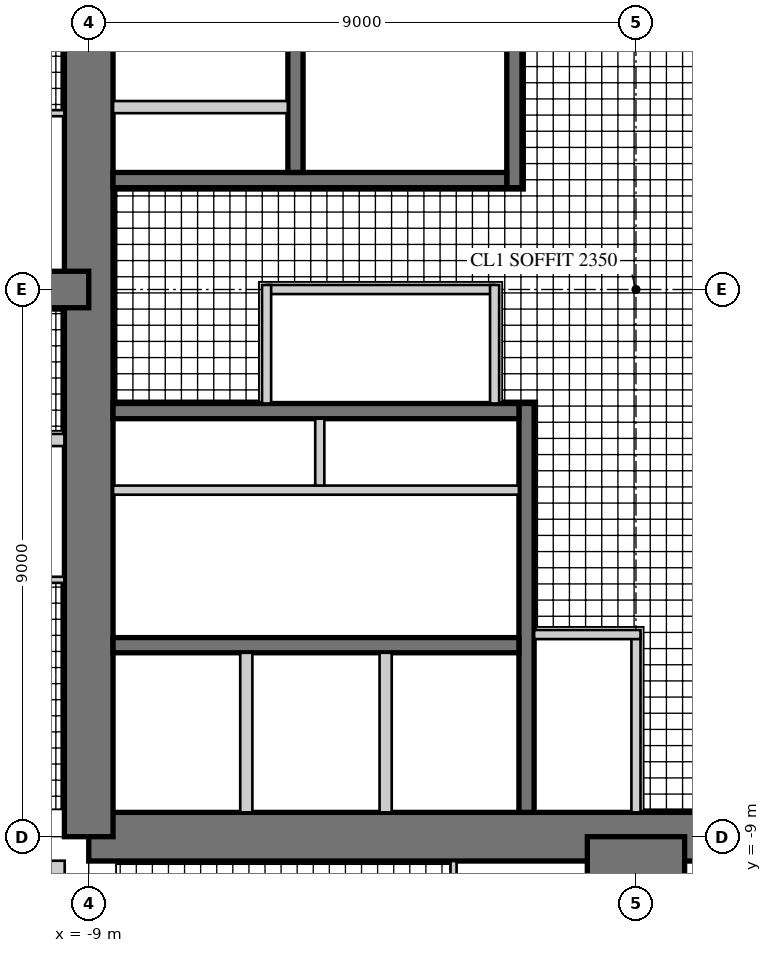
"""IFC4 building model, lengths in metres.
Left out: names, types, materials, properties, quantities, classifications, styles, units other than length and angle.
Written with IfcOpenShell. Run it as: python <this file> out.ifc"""

import sys

from ifc_helpers import new_model, si_unit, direction, frame, frame_2d, origin, place, context, subcontext, project, spatial, rectangle, extrude, element, fill, save


model = new_model("IFC4")
c1 = context("Model", 3, precision=1e-05, world=origin(), true_north=direction((0.0, 1.0)))
c2 = subcontext(c1, "Body", "Model", "MODEL_VIEW")
j1 = project(units=[si_unit("LENGTHUNIT", "METRE"), si_unit("PLANEANGLEUNIT", "RADIAN")], contexts=[c1])
p1 = place(None, origin())
s1 = spatial("IfcSite", under=j1, at=p1, CompositionType="ELEMENT")
p2 = place(p1, origin())
s2 = spatial("IfcBuilding", under=s1, at=p2, CompositionType="ELEMENT")
p3 = place(p2, frame((0.0, 0.0, 225.5)))
s3 = spatial("IfcBuildingStorey", under=s2, at=p3, CompositionType="ELEMENT", Elevation=225.5)
p4 = place(p3, frame((-9.0, -9.0, 0.0), z_axis=(0.0, 0.0, 1.0), x_axis=(1.0, 0.0, 0.0)))
e1 = element("IfcWall", 1, at=p4, inside=s3, PredefinedType="SHEAR", context=c2, shape_type="SweptSolid", body=[
    extrude(rectangle(XDim=18.0, YDim=0.8, at=frame_2d((9.0, 0.0))), origin(), (0.0, 0.0, 1.0), 3.4),
])
p5 = place(p4, frame((9.8, 0.0, 0.0)))
e2 = element("IfcOpeningElement", 2, at=p5, cuts=e1, PredefinedType="OPENING", context=c2, shape_type="SweptSolid", body=[
    extrude(rectangle(XDim=1.0, YDim=2.4, at=frame_2d((0.5, 1.2))), frame((0.0, 0.41, 0.0), z_axis=(0.0, -1.0, 0.0), x_axis=(1.0, 0.0, 0.0)), (0.0, 0.0, 1.0), 0.82),
])
p6 = place(p3, frame((-9.0, 9.0, 0.0), z_axis=(0.0, 0.0, 1.0), x_axis=(0.0, -1.0, 0.0)))
e3 = element("IfcWall", 3, at=p6, inside=s3, PredefinedType="SHEAR", context=c2, shape_type="SweptSolid", body=[
    extrude(rectangle(XDim=18.0, YDim=0.8, at=frame_2d((9.0, 0.0))), origin(), (0.0, 0.0, 1.0), 3.4),
])
p7 = place(p6, frame((9.8, 0.0, 0.0)))
e4 = element("IfcOpeningElement", 4, at=p7, cuts=e3, PredefinedType="OPENING", context=c2, shape_type="SweptSolid", body=[
    extrude(rectangle(XDim=1.0, YDim=2.4, at=frame_2d((0.5, 1.2))), frame((0.0, 0.41, 0.0), z_axis=(0.0, -1.0, 0.0), x_axis=(1.0, 0.0, 0.0)), (0.0, 0.0, 1.0), 0.82),
])
p8 = place(p3, frame((-2.0, 1.675, 0.0), z_axis=(0.0, 0.0, 1.0), x_axis=(0.0, 1.0, 0.0)))
e5 = element("IfcWall", 5, at=p8, inside=s3, PredefinedType="SHEAR", context=c2, shape_type="SweptSolid", body=[
    extrude(rectangle(XDim=6.925, YDim=0.25, at=frame_2d((3.462, 0.0))), origin(), (0.0, 0.0, 1.0), 3.4),
])
p9 = place(p8, frame((0.725, 0.0, 0.0)))
e6 = element("IfcOpeningElement", 6, at=p9, cuts=e5, PredefinedType="OPENING", context=c2, shape_type="SweptSolid", body=[
    extrude(rectangle(XDim=1.0, YDim=2.1, at=frame_2d((0.5, 1.05))), frame((0.0, 0.135, 0.0), z_axis=(0.0, -1.0, 0.0), x_axis=(1.0, 0.0, 0.0)), (0.0, 0.0, 1.0), 0.27),
])
p10 = place(p3, frame((-2.125, 1.8, 0.0), z_axis=(0.0, 0.0, 1.0), x_axis=(-1.0, 0.0, 0.0)))
e7 = element("IfcWall", 7, at=p10, inside=s3, PredefinedType="SHEAR", context=c2, shape_type="SweptSolid", body=[
    extrude(rectangle(XDim=6.475, YDim=0.25, at=frame_2d((3.238, 0.0))), origin(), (0.0, 0.0, 1.0), 3.4),
])
p11 = place(p3, frame((-5.6, 1.925, 0.0), z_axis=(0.0, 0.0, 1.0), x_axis=(0.0, 1.0, 0.0)))
e8 = element("IfcWall", 8, at=p11, inside=s3, PredefinedType="SHEAR", context=c2, shape_type="SweptSolid", body=[
    extrude(rectangle(XDim=3.55, YDim=0.25, at=frame_2d((1.775, 0.0))), origin(), (0.0, 0.0, 1.0), 3.4),
])
p12 = place(p11, frame((1.525, 0.0, 0.0)))
e9 = element("IfcOpeningElement", 9, at=p12, cuts=e8, PredefinedType="OPENING", context=c2, shape_type="SweptSolid", body=[
    extrude(rectangle(XDim=1.1, YDim=2.2, at=frame_2d((0.55, 1.1))), frame((0.0, 0.135, 0.0), z_axis=(0.0, -1.0, 0.0), x_axis=(1.0, 0.0, 0.0)), (0.0, 0.0, 1.0), 0.27),
])
p13 = place(p11, frame((0.075, 0.0, 0.0)))
e10 = element("IfcOpeningElement", 10, at=p13, cuts=e8, PredefinedType="OPENING", context=c2, shape_type="SweptSolid", body=[
    extrude(rectangle(XDim=0.8, YDim=2.1, at=frame_2d((0.4, 1.05))), frame((0.0, 0.135, 0.0), z_axis=(0.0, -1.0, 0.0), x_axis=(1.0, 0.0, 0.0)), (0.0, 0.0, 1.0), 0.27),
])
p14 = place(p3, frame((-5.725, 3.0, 0.0), z_axis=(0.0, 0.0, 1.0), x_axis=(-1.0, 0.0, 0.0)))
e11 = element("IfcWall", 11, at=p14, inside=s3, PredefinedType="PARTITIONING", context=c2, shape_type="SweptSolid", body=[
    extrude(rectangle(XDim=2.875, YDim=0.2, at=frame_2d((1.438, 0.0))), origin(), (0.0, 0.0, 1.0), 3.4),
])
p15 = place(p3, frame((-1.8, -1.875, 0.0), z_axis=(0.0, 0.0, 1.0), x_axis=(0.0, -1.0, 0.0)))
e12 = element("IfcWall", 12, at=p15, inside=s3, PredefinedType="SHEAR", context=c2, shape_type="SweptSolid", body=[
    extrude(rectangle(XDim=6.725, YDim=0.25, at=frame_2d((3.363, 0.0))), origin(), (0.0, 0.0, 1.0), 3.4),
])
p16 = place(p15, frame((1.875, 0.0, 0.0)))
e13 = element("IfcOpeningElement", 13, at=p16, cuts=e12, PredefinedType="OPENING", context=c2, shape_type="SweptSolid", body=[
    extrude(rectangle(XDim=1.6, YDim=2.4, at=frame_2d((0.8, 1.2))), frame((0.0, 0.135, 0.0), z_axis=(0.0, -1.0, 0.0), x_axis=(1.0, 0.0, 0.0)), (0.0, 0.0, 1.0), 0.27),
])
p17 = place(p3, frame((-1.925, -2.0, 0.0), z_axis=(0.0, 0.0, 1.0), x_axis=(-1.0, 0.0, 0.0)))
e14 = element("IfcWall", 14, at=p17, inside=s3, PredefinedType="SHEAR", context=c2, shape_type="SweptSolid", body=[
    extrude(rectangle(XDim=6.675, YDim=0.25, at=frame_2d((3.337, 0.0))), origin(), (0.0, 0.0, 1.0), 3.4),
])
p18 = place(p3, frame((-1.925, -5.85, 0.0), z_axis=(0.0, 0.0, 1.0), x_axis=(-1.0, 0.0, 0.0)))
e15 = element("IfcWall", 15, at=p18, inside=s3, PredefinedType="SHEAR", context=c2, shape_type="SweptSolid", body=[
    extrude(rectangle(XDim=6.675, YDim=0.25, at=frame_2d((3.337, 0.0))), origin(), (0.0, 0.0, 1.0), 3.4),
])
p19 = place(p18, frame((0.496, 0.0, 0.0)))
e16 = element("IfcOpeningElement", 16, at=p19, cuts=e15, PredefinedType="OPENING", context=c2, shape_type="SweptSolid", body=[
    extrude(rectangle(XDim=1.1, YDim=2.2, at=frame_2d((0.55, 1.1))), frame((0.0, 0.135, 0.0), z_axis=(0.0, -1.0, 0.0), x_axis=(1.0, 0.0, 0.0)), (0.0, 0.0, 1.0), 0.27),
])
p20 = place(p18, frame((2.788, 0.0, 0.0)))
e17 = element("IfcOpeningElement", 17, at=p20, cuts=e15, PredefinedType="OPENING", context=c2, shape_type="SweptSolid", body=[
    extrude(rectangle(XDim=1.1, YDim=2.2, at=frame_2d((0.55, 1.1))), frame((0.0, 0.135, 0.0), z_axis=(0.0, -1.0, 0.0), x_axis=(1.0, 0.0, 0.0)), (0.0, 0.0, 1.0), 0.27),
])
p21 = place(p18, frame((5.079, 0.0, 0.0)))
e18 = element("IfcOpeningElement", 18, at=p21, cuts=e15, PredefinedType="OPENING", context=c2, shape_type="SweptSolid", body=[
    extrude(rectangle(XDim=1.1, YDim=2.2, at=frame_2d((0.55, 1.1))), frame((0.0, 0.135, 0.0), z_axis=(0.0, -1.0, 0.0), x_axis=(1.0, 0.0, 0.0)), (0.0, 0.0, 1.0), 0.27),
])
p22 = place(p3, frame((-1.925, -3.3, 0.0), z_axis=(0.0, 0.0, 1.0), x_axis=(-1.0, 0.0, 0.0)))
e19 = element("IfcWall", 19, at=p22, inside=s3, PredefinedType="PARTITIONING", context=c2, shape_type="SweptSolid", body=[
    extrude(rectangle(XDim=6.675, YDim=0.15, at=frame_2d((3.337, 0.0))), origin(), (0.0, 0.0, 1.0), 3.4),
])
p23 = place(p22, frame((0.075, 0.0, 0.0)))
e20 = element("IfcOpeningElement", 20, at=p23, cuts=e19, PredefinedType="OPENING", context=c2, shape_type="SweptSolid", body=[
    extrude(rectangle(XDim=0.8, YDim=2.1, at=frame_2d((0.4, 1.05))), frame((0.0, 0.085, 0.0), z_axis=(0.0, -1.0, 0.0), x_axis=(1.0, 0.0, 0.0)), (0.0, 0.0, 1.0), 0.17),
])
p24 = place(p22, frame((3.675, 0.0, 0.0)))
e21 = element("IfcOpeningElement", 21, at=p24, cuts=e19, PredefinedType="OPENING", context=c2, shape_type="SweptSolid", body=[
    extrude(rectangle(XDim=0.8, YDim=2.1, at=frame_2d((0.4, 1.05))), frame((0.0, 0.085, 0.0), z_axis=(0.0, -1.0, 0.0), x_axis=(1.0, 0.0, 0.0)), (0.0, 0.0, 1.0), 0.17),
])
p25 = place(p3, frame((-5.2, -2.125, 0.0), z_axis=(0.0, 0.0, 1.0), x_axis=(0.0, -1.0, 0.0)))
e22 = element("IfcWall", 22, at=p25, inside=s3, PredefinedType="PARTITIONING", context=c2, shape_type="SweptSolid", body=[
    extrude(rectangle(XDim=1.1, YDim=0.15, at=frame_2d((0.55, 0.0))), origin(), (0.0, 0.0, 1.0), 3.4),
])
for number, where, z_axis, x_axis in (
    (23, (-4.117, -5.975, 0.0), (0.0, 0.0, 1.0), (0.0, -1.0, 0.0)),
    (24, (-6.408, -5.975, 0.0), (0.0, 0.0, 1.0), (0.0, -1.0, 0.0)),
):
    element("IfcWall", number, at=place(p3, frame(where, z_axis=z_axis, x_axis=x_axis)), inside=s3, PredefinedType="PARTITIONING", context=c2, shape_type="SweptSolid", body=[
        extrude(rectangle(XDim=2.625, YDim=0.2, at=frame_2d((1.312, 0.0))), origin(), (0.0, 0.0, 1.0), 3.4),
    ])
p26 = place(p3, frame((0.0, -9.0, 0.0), z_axis=(0.0, 0.0, 1.0), x_axis=(0.0, -1.0, 0.0)))
e25 = element("IfcWall", 25, at=p26, inside=s3, PredefinedType="SHEAR", context=c2, shape_type="SweptSolid", body=[
    extrude(rectangle(XDim=9.0, YDim=1.6, at=frame_2d((4.5, 0.0))), origin(), (0.0, 0.0, 1.0), 3.4),
])
p27 = place(p26, frame((3.8, 0.0, 0.0)))
e26 = element("IfcOpeningElement", 26, at=p27, cuts=e25, PredefinedType="OPENING", context=c2, shape_type="SweptSolid", body=[
    extrude(rectangle(XDim=1.0, YDim=2.15, at=frame_2d((0.5, 1.075))), frame((0.0, 0.81, 0.0), z_axis=(0.0, -1.0, 0.0), x_axis=(1.0, 0.0, 0.0)), (0.0, 0.0, 1.0), 1.62),
])
p28 = place(p26, frame((7.0, 0.0, 0.0)))
e27 = element("IfcOpeningElement", 27, at=p28, cuts=e25, PredefinedType="OPENING", context=c2, shape_type="SweptSolid", body=[
    extrude(rectangle(XDim=1.0, YDim=2.2, at=frame_2d((0.5, 1.1))), frame((0.0, 0.81, 0.0), z_axis=(0.0, -1.0, 0.0), x_axis=(1.0, 0.0, 0.0)), (0.0, 0.0, 1.0), 1.62),
])
p29 = place(p3, frame((-9.0, 0.0, 0.0), z_axis=(0.0, 0.0, 1.0), x_axis=(-1.0, 0.0, 0.0)))
e28 = element("IfcWall", 28, at=p29, inside=s3, PredefinedType="SHEAR", context=c2, shape_type="SweptSolid", body=[
    extrude(rectangle(XDim=18.0, YDim=0.6, at=frame_2d((9.0, 0.0))), origin(), (0.0, 0.0, 1.0), 3.4),
])
p30 = place(p29, frame((3.8, 0.0, 0.0)))
e29 = element("IfcOpeningElement", 29, at=p30, cuts=e28, PredefinedType="OPENING", context=c2, shape_type="SweptSolid", body=[
    extrude(rectangle(XDim=1.0, YDim=2.15, at=frame_2d((0.5, 1.075))), frame((0.0, 0.31, 0.0), z_axis=(0.0, -1.0, 0.0), x_axis=(1.0, 0.0, 0.0)), (0.0, 0.0, 1.0), 0.62),
])
p31 = place(p29, frame((6.6, 0.0, 0.0)))
e30 = element("IfcOpeningElement", 30, at=p31, cuts=e28, PredefinedType="OPENING", context=c2, shape_type="SweptSolid", body=[
    extrude(rectangle(XDim=1.0, YDim=2.15, at=frame_2d((0.5, 1.075))), frame((0.0, 0.31, 0.0), z_axis=(0.0, -1.0, 0.0), x_axis=(1.0, 0.0, 0.0)), (0.0, 0.0, 1.0), 0.62),
])
p32 = place(p29, frame((13.3, 0.0, 0.0)))
e31 = element("IfcOpeningElement", 31, at=p32, cuts=e28, PredefinedType="OPENING", context=c2, shape_type="SweptSolid", body=[
    extrude(rectangle(XDim=1.0, YDim=2.2, at=frame_2d((0.5, 1.1))), frame((0.0, 0.31, 0.0), z_axis=(0.0, -1.0, 0.0), x_axis=(1.0, 0.0, 0.0)), (0.0, 0.0, 1.0), 0.62),
])
p33 = place(p3, frame((-9.52, -9.395, 0.0), z_axis=(0.0, 0.0, 1.0), x_axis=(0.0, -1.0, 0.0)))
e32 = element("IfcWall", 32, at=p33, inside=s3, PredefinedType="SOLIDWALL", context=c2, shape_type="SweptSolid", body=[
    extrude(rectangle(XDim=3.125, YDim=0.25, at=frame_2d((1.562, 0.0))), origin(), (0.0, 0.0, 1.0), 3.22),
])
p34 = place(p33, frame((0.6, 0.0, 0.0)))
e33 = element("IfcOpeningElement", 33, at=p34, cuts=e32, PredefinedType="OPENING", context=c2, shape_type="SweptSolid", body=[
    extrude(rectangle(XDim=1.0, YDim=2.2, at=frame_2d((0.5, 1.1))), frame((0.0, 0.135, 0.0), z_axis=(0.0, -1.0, 0.0), x_axis=(1.0, 0.0, 0.0)), (0.0, 0.0, 1.0), 0.27),
])
p35 = place(p3, frame((-2.325, 0.0, 0.0), z_axis=(0.0, 0.0, 1.0), x_axis=(-1.0, 0.0, 0.0)))
e34 = element("IfcWall", 34, at=p35, inside=s3, PredefinedType="PARTITIONING", context=c2, shape_type="SweptSolid", body=[
    extrude(rectangle(XDim=3.75, YDim=0.15, at=frame_2d((1.875, 0.0))), origin(), (0.0, 0.0, 1.0), 3.22),
])
p36 = place(p35, frame((0.4, 0.0, 0.0)))
e35 = element("IfcOpeningElement", 35, at=p36, cuts=e34, PredefinedType="OPENING", context=c2, shape_type="SweptSolid", body=[
    extrude(rectangle(XDim=1.0, YDim=2.1, at=frame_2d((0.5, 1.05))), frame((0.0, 0.085, 0.0), z_axis=(0.0, -1.0, 0.0), x_axis=(1.0, 0.0, 0.0)), (0.0, 0.0, 1.0), 0.17),
])
for number, where, z_axis, x_axis in (
    (36, (-2.325, -1.875, 0.0), (0.0, 0.0, 1.0), (0.0, 1.0, 0.0)),
    (37, (-6.075, 0.075, 0.0), (0.0, 0.0, 1.0), (0.0, -1.0, 0.0)),
):
    element("IfcWall", number, at=place(p3, frame(where, z_axis=z_axis, x_axis=x_axis)), inside=s3, PredefinedType="PARTITIONING", context=c2, shape_type="SweptSolid", body=[
        extrude(rectangle(XDim=1.95, YDim=0.15, at=frame_2d((0.975, 0.0))), origin(), (0.0, 0.0, 1.0), 3.22),
    ])
p37 = place(p3, frame((0.0, -5.675, 0.0), z_axis=(0.0, 0.0, 1.0), x_axis=(0.0, -1.0, 0.0)))
e38 = element("IfcWall", 38, at=p37, inside=s3, PredefinedType="PARTITIONING", context=c2, shape_type="SweptSolid", body=[
    extrude(rectangle(XDim=2.925, YDim=0.15, at=frame_2d((1.462, 0.0))), origin(), (0.0, 0.0, 1.0), 3.22),
])
p38 = place(p37, frame((0.4, 0.0, 0.0)))
e39 = element("IfcOpeningElement", 39, at=p38, cuts=e38, PredefinedType="OPENING", context=c2, shape_type="SweptSolid", body=[
    extrude(rectangle(XDim=1.0, YDim=2.1, at=frame_2d((0.5, 1.05))), frame((0.0, 0.085, 0.0), z_axis=(0.0, -1.0, 0.0), x_axis=(1.0, 0.0, 0.0)), (0.0, 0.0, 1.0), 0.17),
])
p39 = place(p3, frame((-1.675, -5.675, 0.0), z_axis=(0.0, 0.0, 1.0), x_axis=(1.0, 0.0, 0.0)))
e40 = element("IfcWall", 40, at=p39, inside=s3, PredefinedType="PARTITIONING", context=c2, shape_type="SweptSolid", body=[
    extrude(rectangle(XDim=1.75, YDim=0.15, at=frame_2d((0.875, 0.0))), origin(), (0.0, 0.0, 1.0), 3.22),
])
for number, where, z_axis, x_axis in (
    (41, (-3.0, -9.4, 0.0), (0.0, 0.0, 1.0), (0.0, -1.0, 0.0)),
    (42, (-9.4, -4.775, 0.0), (0.0, 0.0, 1.0), (-1.0, 0.0, 0.0)),
):
    element("IfcWall", number, at=place(p3, frame(where, z_axis=z_axis, x_axis=x_axis)), inside=s3, PredefinedType="PARTITIONING", context=c2, shape_type="SweptSolid", body=[
        extrude(rectangle(XDim=2.65, YDim=0.1, at=frame_2d((1.325, 0.0))), origin(), (0.0, 0.0, 1.0), 3.22),
    ])
p40 = place(p3, frame((-9.4, 2.9, 0.0), z_axis=(0.0, 0.0, 1.0), x_axis=(-1.0, 0.0, 0.0)))
e43 = element("IfcWall", 43, at=p40, inside=s3, PredefinedType="PARTITIONING", context=c2, shape_type="SweptSolid", body=[
    extrude(rectangle(XDim=2.85, YDim=0.1, at=frame_2d((1.425, 0.0))), origin(), (0.0, 0.0, 1.0), 3.22),
])
p41 = place(p3, frame((-9.4, -2.475, 0.0), z_axis=(0.0, 0.0, 1.0), x_axis=(-1.0, 0.0, 0.0)))
e44 = element("IfcWall", 44, at=p41, inside=s3, PredefinedType="SOLIDWALL", context=c2, shape_type="SweptSolid", body=[
    extrude(rectangle(XDim=11.6, YDim=0.2, at=frame_2d((5.8, 0.0))), origin(), (0.0, 0.0, 1.0), 3.22),
])
p42 = place(p41, frame((3.4, 0.0, 0.0)))
e45 = element("IfcOpeningElement", 45, at=p42, cuts=e44, PredefinedType="OPENING", context=c2, shape_type="SweptSolid", body=[
    extrude(rectangle(XDim=1.0, YDim=2.15, at=frame_2d((0.5, 1.075))), frame((0.0, 0.11, 0.0), z_axis=(0.0, -1.0, 0.0), x_axis=(1.0, 0.0, 0.0)), (0.0, 0.0, 1.0), 0.22),
])
p43 = place(p41, frame((6.2, 0.0, 0.0)))
e46 = element("IfcOpeningElement", 46, at=p43, cuts=e44, PredefinedType="OPENING", context=c2, shape_type="SweptSolid", body=[
    extrude(rectangle(XDim=1.0, YDim=2.15, at=frame_2d((0.5, 1.075))), frame((0.0, 0.11, 0.0), z_axis=(0.0, -1.0, 0.0), x_axis=(1.0, 0.0, 0.0)), (0.0, 0.0, 1.0), 0.22),
])
p44 = place(p36, origin())
e47 = element("IfcDoor", 47, at=p44, inside=s3, OperationType="SINGLE_SWING_LEFT", PredefinedType="DOOR", context=c2, shape_type="SweptSolid", body=[
    extrude(rectangle(XDim=1.0, YDim=2.1, at=frame_2d((0.5, 1.05))), frame((0.0, 0.025, 0.0), z_axis=(0.0, -1.0, 0.0), x_axis=(1.0, 0.0, 0.0)), (0.0, 0.0, 1.0), 0.05),
])
fill(e35, e47)
p45 = place(p38, frame((1.0, 0.0, 0.0), z_axis=(0.0, 0.0, 1.0), x_axis=(-1.0, 0.0, 0.0)))
e48 = element("IfcDoor", 48, at=p45, inside=s3, OperationType="SINGLE_SWING_RIGHT", PredefinedType="DOOR", context=c2, shape_type="SweptSolid", body=[
    extrude(rectangle(XDim=1.0, YDim=2.1, at=frame_2d((0.5, 1.05))), frame((0.0, 0.025, 0.0), z_axis=(0.0, -1.0, 0.0), x_axis=(1.0, 0.0, 0.0)), (0.0, 0.0, 1.0), 0.05),
])
fill(e39, e48)
p46 = place(p5, origin())
e49 = element("IfcDoor", 49, at=p46, inside=s3, OperationType="SINGLE_SWING_RIGHT", PredefinedType="DOOR", context=c2, shape_type="SweptSolid", body=[
    extrude(rectangle(XDim=1.0, YDim=2.4, at=frame_2d((0.5, 1.2))), frame((0.0, 0.055, 0.0), z_axis=(0.0, -1.0, 0.0), x_axis=(1.0, 0.0, 0.0)), (0.0, 0.0, 1.0), 0.05),
])
fill(e2, e49)
p47 = place(p7, origin())
e50 = element("IfcDoor", 50, at=p47, inside=s3, OperationType="SINGLE_SWING_RIGHT", PredefinedType="DOOR", context=c2, shape_type="SweptSolid", body=[
    extrude(rectangle(XDim=1.0, YDim=2.4, at=frame_2d((0.5, 1.2))), frame((0.0, 0.055, 0.0), z_axis=(0.0, -1.0, 0.0), x_axis=(1.0, 0.0, 0.0)), (0.0, 0.0, 1.0), 0.05),
])
fill(e4, e50)
p48 = place(p9, origin())
e51 = element("IfcDoor", 51, at=p48, inside=s3, OperationType="SINGLE_SWING_LEFT", PredefinedType="DOOR", context=c2, shape_type="SweptSolid", body=[
    extrude(rectangle(XDim=1.0, YDim=2.1, at=frame_2d((0.5, 1.05))), frame((0.0, 0.025, 0.0), z_axis=(0.0, -1.0, 0.0), x_axis=(1.0, 0.0, 0.0)), (0.0, 0.0, 1.0), 0.05),
])
fill(e6, e51)
p49 = place(p12, origin())
e52 = element("IfcDoor", 52, at=p49, inside=s3, OperationType="DOUBLE_DOOR_SLIDING", PredefinedType="DOOR", context=c2, shape_type="SweptSolid", body=[
    extrude(rectangle(XDim=1.1, YDim=2.2, at=frame_2d((0.55, 1.1))), frame((0.0, 0.025, 0.0), z_axis=(0.0, -1.0, 0.0), x_axis=(1.0, 0.0, 0.0)), (0.0, 0.0, 1.0), 0.05),
])
fill(e9, e52)
p50 = place(p13, origin())
e53 = element("IfcDoor", 53, at=p50, inside=s3, OperationType="SINGLE_SWING_LEFT", PredefinedType="DOOR", context=c2, shape_type="SweptSolid", body=[
    extrude(rectangle(XDim=0.8, YDim=2.1, at=frame_2d((0.4, 1.05))), frame((0.0, 0.025, 0.0), z_axis=(0.0, -1.0, 0.0), x_axis=(1.0, 0.0, 0.0)), (0.0, 0.0, 1.0), 0.05),
])
fill(e10, e53)
p51 = place(p19, origin())
e54 = element("IfcDoor", 54, at=p51, inside=s3, OperationType="DOUBLE_DOOR_SLIDING", PredefinedType="DOOR", context=c2, shape_type="SweptSolid", body=[
    extrude(rectangle(XDim=1.1, YDim=2.2, at=frame_2d((0.55, 1.1))), frame((0.0, 0.025, 0.0), z_axis=(0.0, -1.0, 0.0), x_axis=(1.0, 0.0, 0.0)), (0.0, 0.0, 1.0), 0.05),
])
fill(e16, e54)
p52 = place(p20, origin())
e55 = element("IfcDoor", 55, at=p52, inside=s3, OperationType="DOUBLE_DOOR_SLIDING", PredefinedType="DOOR", context=c2, shape_type="SweptSolid", body=[
    extrude(rectangle(XDim=1.1, YDim=2.2, at=frame_2d((0.55, 1.1))), frame((0.0, 0.025, 0.0), z_axis=(0.0, -1.0, 0.0), x_axis=(1.0, 0.0, 0.0)), (0.0, 0.0, 1.0), 0.05),
])
fill(e17, e55)
p53 = place(p21, origin())
e56 = element("IfcDoor", 56, at=p53, inside=s3, OperationType="DOUBLE_DOOR_SLIDING", PredefinedType="DOOR", context=c2, shape_type="SweptSolid", body=[
    extrude(rectangle(XDim=1.1, YDim=2.2, at=frame_2d((0.55, 1.1))), frame((0.0, 0.025, 0.0), z_axis=(0.0, -1.0, 0.0), x_axis=(1.0, 0.0, 0.0)), (0.0, 0.0, 1.0), 0.05),
])
fill(e18, e56)
p54 = place(p16, origin())
e57 = element("IfcDoor", 57, at=p54, inside=s3, OperationType="DOUBLE_DOOR_DOUBLE_SWING", PredefinedType="DOOR", context=c2, shape_type="SweptSolid", body=[
    extrude(rectangle(XDim=1.6, YDim=2.4, at=frame_2d((0.8, 1.2))), frame((0.0, 0.025, 0.0), z_axis=(0.0, -1.0, 0.0), x_axis=(1.0, 0.0, 0.0)), (0.0, 0.0, 1.0), 0.05),
])
fill(e13, e57)
p55 = place(p23, frame((0.8, 0.0, 0.0), z_axis=(0.0, 0.0, 1.0), x_axis=(-1.0, 0.0, 0.0)))
e58 = element("IfcDoor", 58, at=p55, inside=s3, OperationType="SINGLE_SWING_RIGHT", PredefinedType="DOOR", context=c2, shape_type="SweptSolid", body=[
    extrude(rectangle(XDim=0.8, YDim=2.1, at=frame_2d((0.4, 1.05))), frame((0.0, 0.025, 0.0), z_axis=(0.0, -1.0, 0.0), x_axis=(1.0, 0.0, 0.0)), (0.0, 0.0, 1.0), 0.05),
])
fill(e20, e58)
p56 = place(p24, frame((0.8, 0.0, 0.0), z_axis=(0.0, 0.0, 1.0), x_axis=(-1.0, 0.0, 0.0)))
e59 = element("IfcDoor", 59, at=p56, inside=s3, OperationType="SINGLE_SWING_RIGHT", PredefinedType="DOOR", context=c2, shape_type="SweptSolid", body=[
    extrude(rectangle(XDim=0.8, YDim=2.1, at=frame_2d((0.4, 1.05))), frame((0.0, 0.025, 0.0), z_axis=(0.0, -1.0, 0.0), x_axis=(1.0, 0.0, 0.0)), (0.0, 0.0, 1.0), 0.05),
])
fill(e21, e59)
save(model, sys.argv[1])
